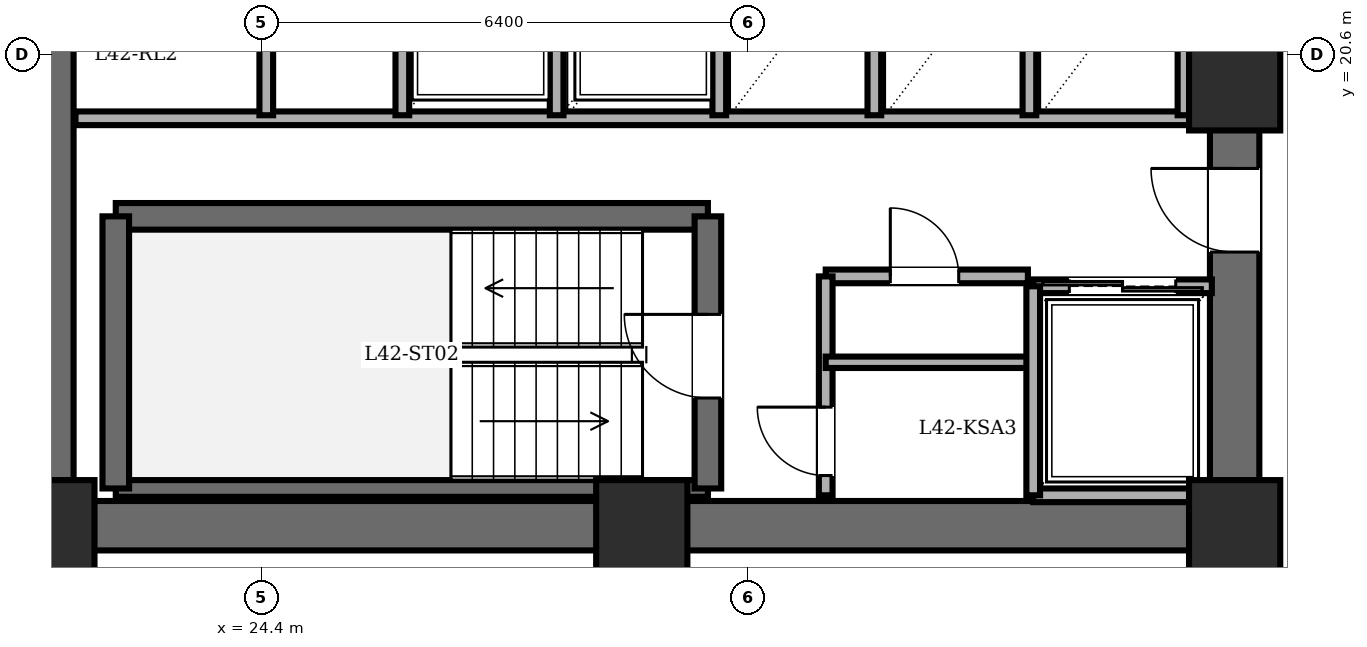
"""IFC4 building model, lengths in metres.
Left out: names, types, materials, properties, quantities, classifications, styles, units other than length and angle.
Written with IfcOpenShell. Run it as: python <this file> out.ifc"""

import sys

from ifc_helpers import new_model, si_unit, direction, frame, frame_2d, origin, origin_2d, place, context, subcontext, project, spatial, rectangle, extrude, element, fill, save


model = new_model("IFC4")
c1 = context("Model", 3, precision=1e-05, world=origin(), true_north=direction((0.0, 1.0)))
c2 = subcontext(c1, "Body", "Model", "MODEL_VIEW")
j1 = project(units=[si_unit("LENGTHUNIT", "METRE"), si_unit("PLANEANGLEUNIT", "RADIAN")], contexts=[c1])
p1 = place(None, origin())
s1 = spatial("IfcSite", under=j1, at=p1, CompositionType="ELEMENT")
p2 = place(p1, origin())
s2 = spatial("IfcBuilding", under=s1, at=p2, CompositionType="ELEMENT")
p3 = place(p2, frame((0.0, 0.0, 161.8)))
s3 = spatial("IfcBuildingStorey", under=s2, at=p3, CompositionType="ELEMENT", Elevation=161.8)
for number, where, z_axis, x_axis in (
    (1, (21.6, 14.4, 0.0), (0.0, 0.0, 1.0), (1.0, 0.0, 0.0)),
    (2, (29.4, 14.4, 0.0), (0.0, 0.0, 1.0), (1.0, 0.0, 0.0)),
    (3, (37.2, 14.4, 0.0), (0.0, 0.0, 1.0), (1.0, 0.0, 0.0)),
    (4, (37.2, 20.2, 0.0), (0.0, 0.0, 1.0), (1.0, 0.0, 0.0)),
):
    element("IfcColumn", number, at=place(p3, frame(where, z_axis=z_axis, x_axis=x_axis)), inside=s3, PredefinedType="COLUMN", context=c2, shape_type="SweptSolid", body=[
        extrude(rectangle(XDim=1.2, YDim=1.2, at=origin_2d()), origin(), (0.0, 0.0, 1.0), 3.6),
    ])
p4 = place(p3, frame((21.6, 14.4, 0.0), z_axis=(0.0, 0.0, 1.0), x_axis=(0.0, 1.0, 0.0)))
e5 = element("IfcWall", 5, at=p4, inside=s3, PredefinedType="SHEAR", context=c2, shape_type="SweptSolid", body=[
    extrude(rectangle(XDim=19.2, YDim=0.65, at=frame_2d((9.6, 0.0))), origin(), (0.0, 0.0, 1.0), 3.4),
])
p5 = place(p3, frame((37.2, 14.4, 0.0), z_axis=(0.0, 0.0, 1.0), x_axis=(-1.0, 0.0, 0.0)))
e6 = element("IfcWall", 6, at=p5, inside=s3, PredefinedType="SHEAR", context=c2, shape_type="SweptSolid", body=[
    extrude(rectangle(XDim=15.6, YDim=0.65, at=frame_2d((7.8, 0.0))), origin(), (0.0, 0.0, 1.0), 3.4),
])
p6 = place(p3, frame((37.2, 14.4, 0.0), z_axis=(0.0, 0.0, 1.0), x_axis=(0.0, 1.0, 0.0)))
e7 = element("IfcWall", 7, at=p6, inside=s3, PredefinedType="SHEAR", context=c2, shape_type="SweptSolid", body=[
    extrude(rectangle(XDim=19.2, YDim=0.65, at=frame_2d((9.6, 0.0))), origin(), (0.0, 0.0, 1.0), 3.4),
])
p7 = place(p6, frame((15.8, 0.0, 0.0)))
e8 = element("IfcOpeningElement", 8, at=p7, cuts=e7, PredefinedType="OPENING", context=c2, shape_type="SweptSolid", body=[
    extrude(rectangle(XDim=1.15, YDim=2.15, at=frame_2d((0.575, 1.075))), frame((0.0, 0.335, 0.0), z_axis=(0.0, -1.0, 0.0), x_axis=(1.0, 0.0, 0.0)), (0.0, 0.0, 1.0), 0.67),
])
p8 = place(p6, frame((3.6, 0.0, 0.0)))
e9 = element("IfcOpeningElement", 9, at=p8, cuts=e7, PredefinedType="OPENING", context=c2, shape_type="SweptSolid", body=[
    extrude(rectangle(XDim=1.1, YDim=2.15, at=frame_2d((0.55, 1.075))), frame((0.0, 0.335, 0.0), z_axis=(0.0, -1.0, 0.0), x_axis=(1.0, 0.0, 0.0)), (0.0, 0.0, 1.0), 0.67),
])
p9 = place(p6, frame((8.6, 0.0, 0.0)))
e10 = element("IfcOpeningElement", 10, at=p9, cuts=e7, PredefinedType="OPENING", context=c2, shape_type="SweptSolid", body=[
    extrude(rectangle(XDim=1.3, YDim=2.2, at=frame_2d((0.65, 1.1))), frame((0.0, 0.335, 0.0), z_axis=(0.0, -1.0, 0.0), x_axis=(1.0, 0.0, 0.0)), (0.0, 0.0, 1.0), 0.67),
])
p10 = place(p3, frame((22.48, 18.47, 0.0), z_axis=(0.0, 0.0, 1.0), x_axis=(1.0, 0.0, 0.0)))
e11 = element("IfcWall", 11, at=p10, inside=s3, PredefinedType="SOLIDWALL", context=c2, shape_type="SweptSolid", body=[
    extrude(rectangle(XDim=7.79, YDim=0.35, at=frame_2d((3.895, 0.0))), origin(), (0.0, 0.0, 1.0), 3.4),
])
p11 = place(p3, frame((22.48, 14.89, 0.0), z_axis=(0.0, 0.0, 1.0), x_axis=(1.0, 0.0, 0.0)))
e12 = element("IfcWall", 12, at=p11, inside=s3, PredefinedType="PARTITIONING", context=c2, shape_type="SweptSolid", body=[
    extrude(rectangle(XDim=7.79, YDim=0.22, at=frame_2d((3.895, 0.0))), origin(), (0.0, 0.0, 1.0), 3.4),
])
p12 = place(p3, frame((22.48, 14.89, 0.0), z_axis=(0.0, 0.0, 1.0), x_axis=(0.0, 1.0, 0.0)))
e13 = element("IfcWall", 13, at=p12, inside=s3, PredefinedType="SOLIDWALL", context=c2, shape_type="SweptSolid", body=[
    extrude(rectangle(XDim=3.58, YDim=0.35, at=frame_2d((1.79, 0.0))), origin(), (0.0, 0.0, 1.0), 3.4),
])
p13 = place(p3, frame((30.27, 14.89, 0.0), z_axis=(0.0, 0.0, 1.0), x_axis=(0.0, 1.0, 0.0)))
e14 = element("IfcWall", 14, at=p13, inside=s3, PredefinedType="SOLIDWALL", context=c2, shape_type="SweptSolid", body=[
    extrude(rectangle(XDim=3.58, YDim=0.35, at=frame_2d((1.79, 0.0))), origin(), (0.0, 0.0, 1.0), 3.4),
])
p14 = place(p13, frame((1.19, 0.0, 0.0)))
e15 = element("IfcOpeningElement", 15, at=p14, cuts=e14, PredefinedType="OPENING", context=c2, shape_type="SweptSolid", body=[
    extrude(rectangle(XDim=1.1, YDim=2.15, at=frame_2d((0.55, 1.075))), frame((0.0, 0.185, 0.0), z_axis=(0.0, -1.0, 0.0), x_axis=(1.0, 0.0, 0.0)), (0.0, 0.0, 1.0), 0.37),
])
p15 = place(p3, frame((21.95, 19.76, 0.0), z_axis=(0.0, 0.0, 1.0), x_axis=(1.0, 0.0, 0.0)))
e16 = element("IfcWall", 16, at=p15, inside=s3, PredefinedType="PARTITIONING", context=c2, shape_type="SweptSolid", body=[
    extrude(rectangle(XDim=14.87, YDim=0.18, at=frame_2d((7.435, 0.0))), origin(), (0.0, 0.0, 1.0), 3.4),
])
p16 = place(p3, frame((31.82, 17.68, 0.0), z_axis=(0.0, 0.0, 1.0), x_axis=(1.0, 0.0, 0.0)))
e17 = element("IfcWall", 17, at=p16, inside=s3, PredefinedType="PARTITIONING", context=c2, shape_type="SweptSolid", body=[
    extrude(rectangle(XDim=2.66, YDim=0.18, at=frame_2d((1.33, 0.0))), origin(), (0.0, 0.0, 1.0), 3.4),
])
p17 = place(p16, frame((0.85, 0.0, 0.0)))
e18 = element("IfcOpeningElement", 18, at=p17, cuts=e17, PredefinedType="OPENING", context=c2, shape_type="SweptSolid", body=[
    extrude(rectangle(XDim=0.9, YDim=2.05, at=frame_2d((0.45, 1.025))), frame((0.0, 0.1, 0.0), z_axis=(0.0, -1.0, 0.0), x_axis=(1.0, 0.0, 0.0)), (0.0, 0.0, 1.0), 0.2),
])
p18 = place(p3, frame((31.82, 14.8, 0.0), z_axis=(0.0, 0.0, 1.0), x_axis=(0.0, 1.0, 0.0)))
e19 = element("IfcWall", 19, at=p18, inside=s3, PredefinedType="PARTITIONING", context=c2, shape_type="SweptSolid", body=[
    extrude(rectangle(XDim=2.88, YDim=0.18, at=frame_2d((1.44, 0.0))), origin(), (0.0, 0.0, 1.0), 3.4),
])
p19 = place(p18, frame((0.26, 0.0, 0.0)))
e20 = element("IfcOpeningElement", 20, at=p19, cuts=e19, PredefinedType="OPENING", context=c2, shape_type="SweptSolid", body=[
    extrude(rectangle(XDim=0.9, YDim=2.05, at=frame_2d((0.45, 1.025))), frame((0.0, 0.1, 0.0), z_axis=(0.0, -1.0, 0.0), x_axis=(1.0, 0.0, 0.0)), (0.0, 0.0, 1.0), 0.2),
])
p20 = place(p3, frame((31.82, 16.55, 0.0), z_axis=(0.0, 0.0, 1.0), x_axis=(1.0, 0.0, 0.0)))
e21 = element("IfcWall", 21, at=p20, inside=s3, PredefinedType="PARTITIONING", context=c2, shape_type="SweptSolid", body=[
    extrude(rectangle(XDim=2.66, YDim=0.15, at=frame_2d((1.33, 0.0))), origin(), (0.0, 0.0, 1.0), 3.4),
])
p21 = place(p3, frame((34.55, 17.55, 0.0), z_axis=(0.0, 0.0, 1.0), x_axis=(1.0, 0.0, 0.0)))
e22 = element("IfcWall", 22, at=p21, inside=s3, PredefinedType="PARTITIONING", context=c2, shape_type="SweptSolid", body=[
    extrude(rectangle(XDim=2.35, YDim=0.18, at=frame_2d((1.175, 0.0))), origin(), (0.0, 0.0, 1.0), 3.4),
])
p22 = place(p21, frame((0.475, 0.0, 0.0)))
e23 = element("IfcOpeningElement", 23, at=p22, cuts=e22, PredefinedType="OPENING", context=c2, shape_type="SweptSolid", body=[
    extrude(rectangle(XDim=1.4, YDim=2.3, at=frame_2d((0.7, 1.15))), frame((0.0, 0.1, 0.0), z_axis=(0.0, -1.0, 0.0), x_axis=(1.0, 0.0, 0.0)), (0.0, 0.0, 1.0), 0.2),
])
p23 = place(p3, frame((36.9, 14.8, 0.0), z_axis=(0.0, 0.0, 1.0), x_axis=(-1.0, 0.0, 0.0)))
e24 = element("IfcWall", 24, at=p23, inside=s3, PredefinedType="PARTITIONING", context=c2, shape_type="SweptSolid", body=[
    extrude(rectangle(XDim=2.35, YDim=0.18, at=frame_2d((1.175, 0.0))), origin(), (0.0, 0.0, 1.0), 3.4),
])
p24 = place(p3, frame((34.55, 17.55, 0.0), z_axis=(0.0, 0.0, 1.0), x_axis=(0.0, -1.0, 0.0)))
e25 = element("IfcWall", 25, at=p24, inside=s3, PredefinedType="PARTITIONING", context=c2, shape_type="SweptSolid", body=[
    extrude(rectangle(XDim=2.75, YDim=0.18, at=frame_2d((1.375, 0.0))), origin(), (0.0, 0.0, 1.0), 3.4),
])
for number, where, z_axis, x_axis in (
    (26, (28.28, 19.8, 0.0), (0.0, 0.0, 1.0), (0.0, 1.0, 0.0)),
    (27, (30.42, 19.8, 0.0), (0.0, 0.0, 1.0), (0.0, 1.0, 0.0)),
    (28, (32.46, 19.8, 0.0), (0.0, 0.0, 1.0), (0.0, 1.0, 0.0)),
    (29, (34.5, 19.8, 0.0), (0.0, 0.0, 1.0), (0.0, 1.0, 0.0)),
    (30, (36.54, 19.8, 0.0), (0.0, 0.0, 1.0), (0.0, 1.0, 0.0)),
):
    element("IfcWall", number, at=place(p3, frame(where, z_axis=z_axis, x_axis=x_axis)), inside=s3, PredefinedType="PARTITIONING", context=c2, shape_type="SweptSolid", body=[
        extrude(rectangle(XDim=2.5, YDim=0.18, at=frame_2d((1.25, 0.0))), origin(), (0.0, 0.0, 1.0), 3.4),
    ])
p25 = place(p3, frame((24.46, 19.8, 0.0), z_axis=(0.0, 0.0, 1.0), x_axis=(0.0, 1.0, 0.0)))
e31 = element("IfcWall", 31, at=p25, inside=s3, PredefinedType="PARTITIONING", context=c2, shape_type="SweptSolid", body=[
    extrude(rectangle(XDim=3.3, YDim=0.18, at=frame_2d((1.65, 0.0))), origin(), (0.0, 0.0, 1.0), 3.4),
])
p26 = place(p25, frame((1.19, 0.0, 0.0)))
e32 = element("IfcOpeningElement", 32, at=p26, cuts=e31, PredefinedType="OPENING", context=c2, shape_type="SweptSolid", body=[
    extrude(rectangle(XDim=0.92, YDim=2.1, at=frame_2d((0.46, 1.05))), frame((0.0, 0.1, 0.0), z_axis=(0.0, -1.0, 0.0), x_axis=(1.0, 0.0, 0.0)), (0.0, 0.0, 1.0), 0.2),
])
p27 = place(p3, frame((26.25, 19.8, 0.0), z_axis=(0.0, 0.0, 1.0), x_axis=(0.0, 1.0, 0.0)))
e33 = element("IfcWall", 33, at=p27, inside=s3, PredefinedType="PARTITIONING", context=c2, shape_type="SweptSolid", body=[
    extrude(rectangle(XDim=2.55, YDim=0.18, at=frame_2d((1.275, 0.0))), origin(), (0.0, 0.0, 1.0), 3.4),
])
p28 = place(p14, origin())
e34 = element("IfcDoor", 34, at=p28, inside=s3, OperationType="SINGLE_SWING_RIGHT", PredefinedType="DOOR", context=c2, shape_type="SweptSolid", body=[
    extrude(rectangle(XDim=1.1, YDim=2.15, at=frame_2d((0.55, 1.075))), frame((0.0, 0.025, 0.0), z_axis=(0.0, -1.0, 0.0), x_axis=(1.0, 0.0, 0.0)), (0.0, 0.0, 1.0), 0.05),
])
fill(e15, e34)
p29 = place(p8, origin())
e35 = element("IfcDoor", 35, at=p29, inside=s3, OperationType="SINGLE_SWING_RIGHT", PredefinedType="DOOR", context=c2, shape_type="SweptSolid", body=[
    extrude(rectangle(XDim=1.1, YDim=2.15, at=frame_2d((0.55, 1.075))), frame((0.0, 0.025, 0.0), z_axis=(0.0, -1.0, 0.0), x_axis=(1.0, 0.0, 0.0)), (0.0, 0.0, 1.0), 0.05),
])
fill(e9, e35)
p30 = place(p17, origin())
e36 = element("IfcDoor", 36, at=p30, inside=s3, OperationType="SINGLE_SWING_LEFT", PredefinedType="DOOR", context=c2, shape_type="SweptSolid", body=[
    extrude(rectangle(XDim=0.9, YDim=2.05, at=frame_2d((0.45, 1.025))), frame((0.0, 0.025, 0.0), z_axis=(0.0, -1.0, 0.0), x_axis=(1.0, 0.0, 0.0)), (0.0, 0.0, 1.0), 0.05),
])
fill(e18, e36)
p31 = place(p19, origin())
e37 = element("IfcDoor", 37, at=p31, inside=s3, OperationType="SINGLE_SWING_RIGHT", PredefinedType="DOOR", context=c2, shape_type="SweptSolid", body=[
    extrude(rectangle(XDim=0.9, YDim=2.05, at=frame_2d((0.45, 1.025))), frame((0.0, 0.025, 0.0), z_axis=(0.0, -1.0, 0.0), x_axis=(1.0, 0.0, 0.0)), (0.0, 0.0, 1.0), 0.05),
])
fill(e20, e37)
p32 = place(p22, origin())
e38 = element("IfcDoor", 38, at=p32, inside=s3, OperationType="DOUBLE_DOOR_SLIDING", PredefinedType="DOOR", context=c2, shape_type="SweptSolid", body=[
    extrude(rectangle(XDim=1.4, YDim=2.3, at=frame_2d((0.7, 1.15))), frame((0.0, 0.025, 0.0), z_axis=(0.0, -1.0, 0.0), x_axis=(1.0, 0.0, 0.0)), (0.0, 0.0, 1.0), 0.05),
])
fill(e23, e38)
save(model, sys.argv[1])
